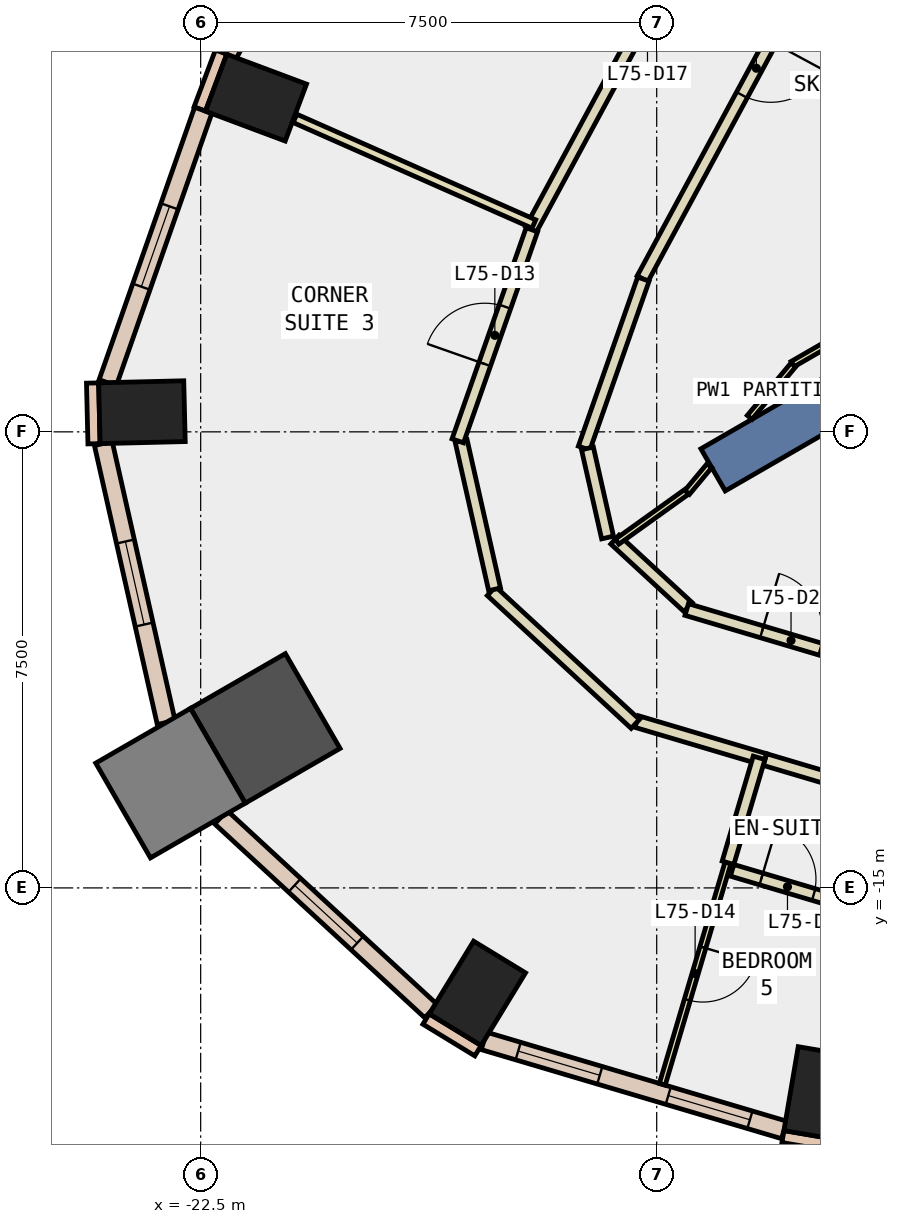
"""IFC4 building model, lengths in metres.
Left out: names, types, materials, properties, quantities, classifications, styles, units other than length and angle.
Written with IfcOpenShell. Run it as: python <this file> out.ifc"""

import sys

from ifc_helpers import new_model, si_unit, direction, frame, frame_2d, origin, origin_2d, place, context, subcontext, project, spatial, rectangle, extrude, element, fill, save


model = new_model("IFC4")
c1 = context("Model", 3, precision=1e-05, world=origin(), true_north=direction((0.0, 1.0)))
c2 = subcontext(c1, "Body", "Model", "MODEL_VIEW")
j1 = project(units=[si_unit("LENGTHUNIT", "METRE"), si_unit("PLANEANGLEUNIT", "RADIAN")], contexts=[c1])
p1 = place(None, origin())
s1 = spatial("IfcSite", under=j1, at=p1, CompositionType="ELEMENT")
p2 = place(p1, origin())
s2 = spatial("IfcBuilding", under=s1, at=p2, CompositionType="ELEMENT")
p3 = place(p2, frame((0.0, 0.0, 318.8)))
s3 = spatial("IfcBuildingStorey", under=s2, at=p3, CompositionType="ELEMENT", Elevation=318.8)
for number, where, z_axis, x_axis in (
    (1, (-12.297, -18.385, -0.34), (0.0, 0.0, 1.0), (-0.986, 0.168, 0.0)),
    (2, (-21.59, -2.004, -0.34), (0.0, 0.0, 1.0), (0.351, 0.936, 0.0)),
    (3, (-23.466, -7.177, -0.34), (0.0, 0.0, 1.0), (-0.024, 1.0, 0.0)),
):
    element("IfcColumn", number, at=place(p3, frame(where, z_axis=z_axis, x_axis=x_axis)), inside=s3, PredefinedType="COLUMN", context=c2, shape_type="SweptSolid", body=[
        extrude(rectangle(XDim=1.0, YDim=1.4, at=origin_2d()), origin(), (0.0, 0.0, 1.0), 3.6),
    ])
p4 = place(p3, frame((-21.437, -12.377, -0.34), z_axis=(0.0, 0.0, 1.0), x_axis=(0.866025403784, 0.5, 0.0)))
e4 = element("IfcColumn", 4, at=p4, inside=s3, PredefinedType="COLUMN", context=c2, shape_type="SweptSolid", body=[
    extrude(rectangle(XDim=1.8, YDim=1.8, at=origin_2d()), origin(), (0.0, 0.0, 1.0), 3.6),
])
p5 = place(p3, frame((-17.949, -16.734, -0.34), z_axis=(0.0, 0.0, 1.0), x_axis=(-0.853650808213, 0.520845752251, 0.0)))
e5 = element("IfcColumn", 5, at=p5, inside=s3, PredefinedType="COLUMN", context=c2, shape_type="SweptSolid", body=[
    extrude(rectangle(XDim=1.0, YDim=1.4, at=origin_2d()), origin(), (0.0, 0.0, 1.0), 3.6),
])
p6 = place(p3, frame((-22.996, -13.277, -0.34), z_axis=(0.0, 0.0, 1.0), x_axis=(0.866025403784, 0.5, 0.0)))
e6 = element("IfcColumn", 6, at=p6, inside=s3, PredefinedType="COLUMN", context=c2, shape_type="SweptSolid", body=[
    extrude(rectangle(XDim=1.8, YDim=1.8, at=origin_2d()), origin(), (0.0, 0.0, 1.0), 3.6),
])
p7 = place(p3, frame((-6.279, -3.625, -0.34), z_axis=(0.0, 0.0, 1.0), x_axis=(-0.866017533419, -0.500013631625, 0.0)))
e7 = element("IfcWall", 7, at=p7, inside=s3, PredefinedType="SHEAR", context=c2, shape_type="SweptSolid", body=[
    extrude(rectangle(XDim=9.0, YDim=0.8, at=frame_2d((4.5, 0.0))), origin(), (0.0, 0.0, 1.0), 3.6),
])
p8 = place(p3, frame((-22.164, -1.255, 0.0), z_axis=(0.0, 0.0, 1.0), x_axis=(-0.350962844851, -0.936389385637, 0.0)))
e8 = element("IfcWall", 8, at=p8, inside=s3, PredefinedType="STANDARD", context=c2, shape_type="SweptSolid", body=[
    extrude(rectangle(XDim=1.0, YDim=0.2, at=frame_2d((0.5, 0.0))), origin(), (0.0, 0.0, 1.0), 3.26),
])
p9 = place(p3, frame((-12.924, -19.089, 0.0), z_axis=(0.0, 0.0, 1.0), x_axis=(0.985800545746, -0.167920469293, 0.0)))
e9 = element("IfcWall", 9, at=p9, inside=s3, PredefinedType="STANDARD", context=c2, shape_type="SweptSolid", body=[
    extrude(rectangle(XDim=1.0, YDim=0.2, at=frame_2d((0.5, 0.0))), origin(), (0.0, 0.0, 1.0), 3.26),
])
p10 = place(p3, frame((-24.278, -6.697, 0.0), z_axis=(0.0, 0.0, 1.0), x_axis=(0.024186470916, -0.999707464524, 0.0)))
e10 = element("IfcWall", 10, at=p10, inside=s3, PredefinedType="STANDARD", context=c2, shape_type="SweptSolid", body=[
    extrude(rectangle(XDim=0.999, YDim=0.2, at=frame_2d((0.5, 0.0))), origin(), (0.0, 0.0, 1.0), 3.26),
])
p11 = place(p3, frame((-18.793, -17.156, 0.0), z_axis=(0.0, 0.0, 1.0), x_axis=(0.853679739553, -0.520798331677, 0.0)))
e11 = element("IfcWall", 11, at=p11, inside=s3, PredefinedType="STANDARD", context=c2, shape_type="SweptSolid", body=[
    extrude(rectangle(XDim=1.0, YDim=0.2, at=frame_2d((0.5, 0.0))), origin(), (0.0, 0.0, 1.0), 3.26),
])
p12 = place(p3, frame((-18.492, 5.285, 0.0), z_axis=(0.0, 0.0, 1.0), x_axis=(-0.475690331633, -0.879612817319, 0.0)))
e12 = element("IfcWall", 12, at=p12, inside=s3, PredefinedType="STANDARD", context=c2, shape_type="SweptSolid", body=[
    extrude(rectangle(XDim=7.484, YDim=0.3, at=frame_2d((3.742, 0.0))), origin(), (0.0, 0.0, 1.0), 3.26),
])
p13 = place(p12, frame((0.771, 0.0, 0.9)))
e13 = element("IfcOpeningElement", 13, at=p13, cuts=e12, PredefinedType="OPENING", context=c2, shape_type="SweptSolid", body=[
    extrude(rectangle(XDim=2.2, YDim=2.0, at=frame_2d((1.1, 1.0))), frame((0.0, 0.16, 0.0), z_axis=(0.0, -1.0, 0.0), x_axis=(1.0, 0.0, 0.0)), (0.0, 0.0, 1.0), 0.32),
])
p14 = place(p12, frame((4.513, 0.0, 0.9)))
e14 = element("IfcOpeningElement", 14, at=p14, cuts=e12, PredefinedType="OPENING", context=c2, shape_type="SweptSolid", body=[
    extrude(rectangle(XDim=2.2, YDim=2.0, at=frame_2d((1.1, 1.0))), frame((0.0, 0.16, 0.0), z_axis=(0.0, -1.0, 0.0), x_axis=(1.0, 0.0, 0.0)), (0.0, 0.0, 1.0), 0.32),
])
p15 = place(p3, frame((-22.458, -2.212, 0.0), z_axis=(0.0, 0.0, 1.0), x_axis=(-0.330923030855, -0.943657749213, 0.0)))
e15 = element("IfcWall", 15, at=p15, inside=s3, PredefinedType="STANDARD", context=c2, shape_type="SweptSolid", body=[
    extrude(rectangle(XDim=4.748, YDim=0.3, at=frame_2d((2.374, 0.0))), origin(), (0.0, 0.0, 1.0), 3.26),
])
p16 = place(p15, frame((1.674, 0.0, 0.9)))
e16 = element("IfcOpeningElement", 16, at=p16, cuts=e15, PredefinedType="OPENING", context=c2, shape_type="SweptSolid", body=[
    extrude(rectangle(XDim=1.4, YDim=2.0, at=frame_2d((0.7, 1.0))), frame((0.0, 0.16, 0.0), z_axis=(0.0, -1.0, 0.0), x_axis=(1.0, 0.0, 0.0)), (0.0, 0.0, 1.0), 0.32),
])
p17 = place(p3, frame((-24.101, -7.692, 0.0), z_axis=(0.0, 0.0, 1.0), x_axis=(0.219886442412, -0.975525475036, 0.0)))
e17 = element("IfcWall", 17, at=p17, inside=s3, PredefinedType="STANDARD", context=c2, shape_type="SweptSolid", body=[
    extrude(rectangle(XDim=4.703, YDim=0.3, at=frame_2d((2.352, 0.0))), origin(), (0.0, 0.0, 1.0), 3.26),
])
p18 = place(p17, frame((1.652, 0.0, 0.9)))
e18 = element("IfcOpeningElement", 18, at=p18, cuts=e17, PredefinedType="OPENING", context=c2, shape_type="SweptSolid", body=[
    extrude(rectangle(XDim=1.4, YDim=2.0, at=frame_2d((0.7, 1.0))), frame((0.0, 0.16, 0.0), z_axis=(0.0, -1.0, 0.0), x_axis=(1.0, 0.0, 0.0)), (0.0, 0.0, 1.0), 0.32),
])
p19 = place(p3, frame((-22.168, -13.837, 0.0), z_axis=(0.0, 0.0, 1.0), x_axis=(0.734934798699, -0.678137774838, 0.0)))
e19 = element("IfcWall", 19, at=p19, inside=s3, PredefinedType="STANDARD", context=c2, shape_type="SweptSolid", body=[
    extrude(rectangle(XDim=4.703, YDim=0.3, at=frame_2d((2.351, 0.0))), origin(), (0.0, 0.0, 1.0), 3.26),
])
p20 = place(p19, frame((1.651, 0.0, 0.9)))
e20 = element("IfcOpeningElement", 20, at=p20, cuts=e19, PredefinedType="OPENING", context=c2, shape_type="SweptSolid", body=[
    extrude(rectangle(XDim=1.4, YDim=2.0, at=frame_2d((0.7, 1.0))), frame((0.0, 0.16, 0.0), z_axis=(0.0, -1.0, 0.0), x_axis=(1.0, 0.0, 0.0)), (0.0, 0.0, 1.0), 0.32),
])
p21 = place(p3, frame((-17.842, -17.516, 0.0), z_axis=(0.0, 0.0, 1.0), x_axis=(0.958757933751, -0.284223898486, 0.0)))
e21 = element("IfcWall", 21, at=p21, inside=s3, PredefinedType="STANDARD", context=c2, shape_type="SweptSolid", body=[
    extrude(rectangle(XDim=5.15, YDim=0.3, at=frame_2d((2.575, 0.0))), origin(), (0.0, 0.0, 1.0), 3.26),
])
p22 = place(p21, frame((0.588, 0.0, 0.9)))
e22 = element("IfcOpeningElement", 22, at=p22, cuts=e21, PredefinedType="OPENING", context=c2, shape_type="SweptSolid", body=[
    extrude(rectangle(XDim=1.4, YDim=2.0, at=frame_2d((0.7, 1.0))), frame((0.0, 0.16, 0.0), z_axis=(0.0, -1.0, 0.0), x_axis=(1.0, 0.0, 0.0)), (0.0, 0.0, 1.0), 0.32),
])
p23 = place(p21, frame((3.163, 0.0, 0.9)))
e23 = element("IfcOpeningElement", 23, at=p23, cuts=e21, PredefinedType="OPENING", context=c2, shape_type="SweptSolid", body=[
    extrude(rectangle(XDim=1.4, YDim=2.0, at=frame_2d((0.7, 1.0))), frame((0.0, 0.16, 0.0), z_axis=(0.0, -1.0, 0.0), x_axis=(1.0, 0.0, 0.0)), (0.0, 0.0, 1.0), 0.32),
])
p24 = place(p3, frame((-11.489, 1.942, 0.0), z_axis=(0.0, 0.0, 1.0), x_axis=(-0.475643534049, -0.879638123615, 0.0)))
e24 = element("IfcWall", 24, at=p24, inside=s3, PredefinedType="PARTITIONING", context=c2, shape_type="SweptSolid", body=[
    extrude(rectangle(XDim=7.871, YDim=0.2, at=frame_2d((3.936, 0.0))), origin(), (0.0, 0.0, 1.0), 3.26),
])
p25 = place(p24, frame((3.436, 0.0, 0.0)))
e25 = element("IfcOpeningElement", 25, at=p25, cuts=e24, PredefinedType="OPENING", context=c2, shape_type="SweptSolid", body=[
    extrude(rectangle(XDim=1.0, YDim=2.1, at=frame_2d((0.5, 1.05))), frame((0.0, 0.11, 0.0), z_axis=(0.0, -1.0, 0.0), x_axis=(1.0, 0.0, 0.0)), (0.0, 0.0, 1.0), 0.22),
])
p26 = place(p3, frame((-15.219, -4.988, 0.0), z_axis=(0.0, 0.0, 1.0), x_axis=(-0.330981563235, -0.943637220969, 0.0)))
e26 = element("IfcWall", 26, at=p26, inside=s3, PredefinedType="PARTITIONING", context=c2, shape_type="SweptSolid", body=[
    extrude(rectangle(XDim=2.946, YDim=0.2, at=frame_2d((1.473, 0.0))), origin(), (0.0, 0.0, 1.0), 3.26),
])
p27 = place(p3, frame((-16.139, -7.772, 0.0), z_axis=(0.0, 0.0, 1.0), x_axis=(0.220111291919, -0.975474766034, 0.0)))
e27 = element("IfcWall", 27, at=p27, inside=s3, PredefinedType="PARTITIONING", context=c2, shape_type="SweptSolid", body=[
    extrude(rectangle(XDim=1.503, YDim=0.2, at=frame_2d((0.751, 0.0))), origin(), (0.0, 0.0, 1.0), 3.26),
])
p28 = place(p3, frame((-15.687, -9.272, 0.0), z_axis=(0.0, 0.0, 1.0), x_axis=(0.734946370973, -0.67812523312, 0.0)))
e28 = element("IfcWall", 28, at=p28, inside=s3, PredefinedType="PARTITIONING", context=c2, shape_type="SweptSolid", body=[
    extrude(rectangle(XDim=1.637, YDim=0.2, at=frame_2d((0.818, 0.0))), origin(), (0.0, 0.0, 1.0), 3.26),
])
p29 = place(p3, frame((-14.506, -10.422, 0.0), z_axis=(0.0, 0.0, 1.0), x_axis=(0.958760241353, -0.284216114252, 0.0)))
e29 = element("IfcWall", 29, at=p29, inside=s3, PredefinedType="PARTITIONING", context=c2, shape_type="SweptSolid", body=[
    extrude(rectangle(XDim=3.578, YDim=0.2, at=frame_2d((1.789, 0.0))), origin(), (0.0, 0.0, 1.0), 3.26),
])
p30 = place(p29, frame((1.289, 0.0, 0.0)))
e30 = element("IfcOpeningElement", 30, at=p30, cuts=e29, PredefinedType="OPENING", context=c2, shape_type="SweptSolid", body=[
    extrude(rectangle(XDim=1.0, YDim=2.1, at=frame_2d((0.5, 1.05))), frame((0.0, 0.11, 0.0), z_axis=(0.0, -1.0, 0.0), x_axis=(1.0, 0.0, 0.0)), (0.0, 0.0, 1.0), 0.22),
])
p31 = place(p3, frame((-17.068, -4.17, 0.0), z_axis=(0.0, 0.0, 1.0), x_axis=(0.475681790703, 0.879617436158, 0.0)))
e31 = element("IfcWall", 31, at=p31, inside=s3, PredefinedType="PARTITIONING", context=c2, shape_type="SweptSolid", body=[
    extrude(rectangle(XDim=8.058, YDim=0.2, at=frame_2d((4.029, 0.0))), origin(), (0.0, 0.0, 1.0), 3.26),
])
p32 = place(p31, frame((3.529, 0.0, 0.0)))
e32 = element("IfcOpeningElement", 32, at=p32, cuts=e31, PredefinedType="OPENING", context=c2, shape_type="SweptSolid", body=[
    extrude(rectangle(XDim=1.0, YDim=2.1, at=frame_2d((0.5, 1.05))), frame((0.0, 0.11, 0.0), z_axis=(0.0, -1.0, 0.0), x_axis=(1.0, 0.0, 0.0)), (0.0, 0.0, 1.0), 0.22),
])
p33 = place(p3, frame((-13.22, -12.889, 0.0), z_axis=(0.0, 0.0, 1.0), x_axis=(-0.958789155152, 0.284118559693, 0.0)))
e33 = element("IfcWall", 33, at=p33, inside=s3, PredefinedType="PARTITIONING", context=c2, shape_type="SweptSolid", body=[
    extrude(rectangle(XDim=2.2, YDim=0.2, at=frame_2d((1.1, 0.0))), origin(), (0.0, 0.0, 1.0), 3.26),
])
p34 = place(p3, frame((-15.352, -12.303, 0.0), z_axis=(0.0, 0.0, 1.0), x_axis=(-0.734786003021, 0.67829899732, 0.0)))
e34 = element("IfcWall", 34, at=p34, inside=s3, PredefinedType="PARTITIONING", context=c2, shape_type="SweptSolid", body=[
    extrude(rectangle(XDim=3.22, YDim=0.2, at=frame_2d((1.61, 0.0))), origin(), (0.0, 0.0, 1.0), 3.26),
])
p35 = place(p3, frame((-17.666, -10.09, 0.0), z_axis=(0.0, 0.0, 1.0), x_axis=(-0.219979161162, 0.975504571314, 0.0)))
e35 = element("IfcWall", 35, at=p35, inside=s3, PredefinedType="PARTITIONING", context=c2, shape_type="SweptSolid", body=[
    extrude(rectangle(XDim=2.5, YDim=0.2, at=frame_2d((1.25, 0.0))), origin(), (0.0, 0.0, 1.0), 3.26),
])
p36 = place(p3, frame((-18.271, -7.648, 0.0), z_axis=(0.0, 0.0, 1.0), x_axis=(0.33112192567, 0.943587977001, 0.0)))
e36 = element("IfcWall", 36, at=p36, inside=s3, PredefinedType="PARTITIONING", context=c2, shape_type="SweptSolid", body=[
    extrude(rectangle(XDim=3.678, YDim=0.2, at=frame_2d((1.839, 0.0))), origin(), (0.0, 0.0, 1.0), 3.26),
])
p37 = place(p36, frame((1.339, 0.0, 0.0)))
e37 = element("IfcOpeningElement", 37, at=p37, cuts=e36, PredefinedType="OPENING", context=c2, shape_type="SweptSolid", body=[
    extrude(rectangle(XDim=1.0, YDim=2.1, at=frame_2d((0.5, 1.05))), frame((0.0, 0.11, 0.0), z_axis=(0.0, -1.0, 0.0), x_axis=(1.0, 0.0, 0.0)), (0.0, 0.0, 1.0), 0.22),
])
p38 = place(p3, frame((-11.495, -13.401, 0.0), z_axis=(0.0, 0.0, 1.0), x_axis=(-0.958662482938, 0.284545679649, 0.0)))
e38 = element("IfcWall", 38, at=p38, inside=s3, PredefinedType="PARTITIONING", context=c2, shape_type="SweptSolid", body=[
    extrude(rectangle(XDim=1.799, YDim=0.2, at=frame_2d((0.9, 0.0))), origin(), (0.0, 0.0, 1.0), 3.26),
])
p39 = place(p3, frame((-6.705, -2.887, 0.0), z_axis=(0.0, 0.0, 1.0), x_axis=(-0.866001397039, -0.500041578597, 0.0)))
e39 = element("IfcWall", 39, at=p39, inside=s3, PredefinedType="PARTITIONING", context=c2, shape_type="SweptSolid", body=[
    extrude(rectangle(XDim=6.998, YDim=0.1, at=frame_2d((3.499, 0.0))), origin(), (0.0, 0.0, 1.0), 3.26),
])
p40 = place(p3, frame((-12.753, -6.399, 0.0), z_axis=(0.0, 0.0, 1.0), x_axis=(-0.640077503072, -0.768310347491, 0.0)))
e40 = element("IfcWall", 40, at=p40, inside=s3, PredefinedType="PARTITIONING", context=c2, shape_type="SweptSolid", body=[
    extrude(rectangle(XDim=1.123, YDim=0.1, at=frame_2d((0.562, 0.0))), origin(), (0.0, 0.0, 1.0), 3.26),
])
p41 = place(p3, frame((-14.507, -8.486, 0.0), z_axis=(0.0, 0.0, 1.0), x_axis=(-0.812782900134, -0.582566697684, 0.0)))
e41 = element("IfcWall", 41, at=p41, inside=s3, PredefinedType="PARTITIONING", context=c2, shape_type="SweptSolid", body=[
    extrude(rectangle(XDim=1.407, YDim=0.1, at=frame_2d((0.704, 0.0))), origin(), (0.0, 0.0, 1.0), 3.26),
])
p42 = place(p3, frame((-17.02, -4.082, 0.0), z_axis=(0.0, 0.0, 1.0), x_axis=(-0.914599611743, 0.404360668462, 0.0)))
e42 = element("IfcWall", 42, at=p42, inside=s3, PredefinedType="PARTITIONING", context=c2, shape_type="SweptSolid", body=[
    extrude(rectangle(XDim=4.296, YDim=0.15, at=frame_2d((2.148, 0.0))), origin(), (0.0, 0.0, 1.0), 3.26),
])
p43 = place(p3, frame((-13.828, -14.587, 0.0), z_axis=(0.0, 0.0, 1.0), x_axis=(-0.284245833657, -0.958751430794, 0.0)))
e43 = element("IfcWall", 43, at=p43, inside=s3, PredefinedType="PARTITIONING", context=c2, shape_type="SweptSolid", body=[
    extrude(rectangle(XDim=3.8, YDim=0.1, at=frame_2d((1.9, 0.0))), origin(), (0.0, 0.0, 1.0), 3.26),
])
p44 = place(p43, frame((1.45, 0.0, 0.0)))
e44 = element("IfcOpeningElement", 44, at=p44, cuts=e43, PredefinedType="OPENING", context=c2, shape_type="SweptSolid", body=[
    extrude(rectangle(XDim=0.9, YDim=2.1, at=frame_2d((0.45, 1.05))), frame((0.0, 0.06, 0.0), z_axis=(0.0, -1.0, 0.0), x_axis=(1.0, 0.0, 0.0)), (0.0, 0.0, 1.0), 0.12),
])
p45 = place(p3, frame((-13.316, -12.861, 0.0), z_axis=(0.0, 0.0, 1.0), x_axis=(-0.283898972531, -0.958854198195, 0.0)))
e45 = element("IfcWall", 45, at=p45, inside=s3, PredefinedType="PARTITIONING", context=c2, shape_type="SweptSolid", body=[
    extrude(rectangle(XDim=1.8, YDim=0.2, at=frame_2d((0.9, 0.0))), origin(), (0.0, 0.0, 1.0), 3.26),
])
p46 = place(p3, frame((-13.76, -14.711, 0.0), z_axis=(0.0, 0.0, 1.0), x_axis=(0.958772187895, -0.284175811285, 0.0)))
e46 = element("IfcWall", 46, at=p46, inside=s3, PredefinedType="PARTITIONING", context=c2, shape_type="SweptSolid", body=[
    extrude(rectangle(XDim=1.9, YDim=0.2, at=frame_2d((0.95, 0.0))), origin(), (0.0, 0.0, 1.0), 3.26),
])
p47 = place(p46, frame((0.5, 0.0, 0.0)))
e47 = element("IfcOpeningElement", 47, at=p47, cuts=e46, PredefinedType="OPENING", context=c2, shape_type="SweptSolid", body=[
    extrude(rectangle(XDim=0.9, YDim=2.1, at=frame_2d((0.45, 1.05))), frame((0.0, 0.11, 0.0), z_axis=(0.0, -1.0, 0.0), x_axis=(1.0, 0.0, 0.0)), (0.0, 0.0, 1.0), 0.22),
])
p48 = place(p3, frame((-14.133, -8.056, 0.0), z_axis=(0.0, 0.0, 1.0), x_axis=(-0.640142394154, -0.768256282244, 0.0)))
e48 = element("IfcWall", 48, at=p48, inside=s3, PredefinedType="PARTITIONING", context=c2, shape_type="SweptSolid", body=[
    extrude(rectangle(XDim=0.572, YDim=0.1, at=frame_2d((0.286, 0.0))), origin(), (0.0, 0.0, 1.0), 3.26),
])
p49 = place(p16, origin())
e49 = element("IfcWindow", 49, at=p49, inside=s3, PartitioningType="SINGLE_PANEL", PredefinedType="WINDOW", context=c2, shape_type="SweptSolid", body=[
    extrude(rectangle(XDim=1.4, YDim=2.0, at=frame_2d((0.7, 1.0))), frame((0.0, 0.03, 0.0), z_axis=(0.0, -1.0, 0.0), x_axis=(1.0, 0.0, 0.0)), (0.0, 0.0, 1.0), 0.06),
])
fill(e16, e49)
p50 = place(p18, origin())
e50 = element("IfcWindow", 50, at=p50, inside=s3, PartitioningType="SINGLE_PANEL", PredefinedType="WINDOW", context=c2, shape_type="SweptSolid", body=[
    extrude(rectangle(XDim=1.4, YDim=2.0, at=frame_2d((0.7, 1.0))), frame((0.0, 0.03, 0.0), z_axis=(0.0, -1.0, 0.0), x_axis=(1.0, 0.0, 0.0)), (0.0, 0.0, 1.0), 0.06),
])
fill(e18, e50)
p51 = place(p20, origin())
e51 = element("IfcWindow", 51, at=p51, inside=s3, PartitioningType="SINGLE_PANEL", PredefinedType="WINDOW", context=c2, shape_type="SweptSolid", body=[
    extrude(rectangle(XDim=1.4, YDim=2.0, at=frame_2d((0.7, 1.0))), frame((0.0, 0.03, 0.0), z_axis=(0.0, -1.0, 0.0), x_axis=(1.0, 0.0, 0.0)), (0.0, 0.0, 1.0), 0.06),
])
fill(e20, e51)
p52 = place(p22, origin())
e52 = element("IfcWindow", 52, at=p52, inside=s3, PartitioningType="SINGLE_PANEL", PredefinedType="WINDOW", context=c2, shape_type="SweptSolid", body=[
    extrude(rectangle(XDim=1.4, YDim=2.0, at=frame_2d((0.7, 1.0))), frame((0.0, 0.03, 0.0), z_axis=(0.0, -1.0, 0.0), x_axis=(1.0, 0.0, 0.0)), (0.0, 0.0, 1.0), 0.06),
])
fill(e22, e52)
p53 = place(p23, origin())
e53 = element("IfcWindow", 53, at=p53, inside=s3, PartitioningType="SINGLE_PANEL", PredefinedType="WINDOW", context=c2, shape_type="SweptSolid", body=[
    extrude(rectangle(XDim=1.4, YDim=2.0, at=frame_2d((0.7, 1.0))), frame((0.0, 0.03, 0.0), z_axis=(0.0, -1.0, 0.0), x_axis=(1.0, 0.0, 0.0)), (0.0, 0.0, 1.0), 0.06),
])
fill(e23, e53)
p54 = place(p37, origin())
e54 = element("IfcDoor", 54, at=p54, inside=s3, OperationType="SINGLE_SWING_LEFT", PredefinedType="DOOR", context=c2, shape_type="SweptSolid", body=[
    extrude(rectangle(XDim=1.0, YDim=2.1, at=frame_2d((0.5, 1.05))), frame((0.0, 0.025, 0.0), z_axis=(0.0, -1.0, 0.0), x_axis=(1.0, 0.0, 0.0)), (0.0, 0.0, 1.0), 0.05),
])
fill(e37, e54)
p55 = place(p44, origin())
e55 = element("IfcDoor", 55, at=p55, inside=s3, OperationType="SINGLE_SWING_RIGHT", PredefinedType="DOOR", context=c2, shape_type="SweptSolid", body=[
    extrude(rectangle(XDim=0.9, YDim=2.1, at=frame_2d((0.45, 1.05))), frame((0.0, 0.025, 0.0), z_axis=(0.0, -1.0, 0.0), x_axis=(1.0, 0.0, 0.0)), (0.0, 0.0, 1.0), 0.05),
])
fill(e44, e55)
p56 = place(p47, origin())
e56 = element("IfcDoor", 56, at=p56, inside=s3, OperationType="SINGLE_SWING_LEFT", PredefinedType="DOOR", context=c2, shape_type="SweptSolid", body=[
    extrude(rectangle(XDim=0.9, YDim=2.1, at=frame_2d((0.45, 1.05))), frame((0.0, 0.025, 0.0), z_axis=(0.0, -1.0, 0.0), x_axis=(1.0, 0.0, 0.0)), (0.0, 0.0, 1.0), 0.05),
])
fill(e47, e56)
p57 = place(p25, origin())
e57 = element("IfcDoor", 57, at=p57, inside=s3, OperationType="SINGLE_SWING_LEFT", PredefinedType="DOOR", context=c2, shape_type="SweptSolid", body=[
    extrude(rectangle(XDim=1.0, YDim=2.1, at=frame_2d((0.5, 1.05))), frame((0.0, 0.025, 0.0), z_axis=(0.0, -1.0, 0.0), x_axis=(1.0, 0.0, 0.0)), (0.0, 0.0, 1.0), 0.05),
])
fill(e25, e57)
p58 = place(p30, origin())
e58 = element("IfcDoor", 58, at=p58, inside=s3, OperationType="SINGLE_SWING_RIGHT", PredefinedType="DOOR", context=c2, shape_type="SweptSolid", body=[
    extrude(rectangle(XDim=1.0, YDim=2.1, at=frame_2d((0.5, 1.05))), frame((0.0, 0.025, 0.0), z_axis=(0.0, -1.0, 0.0), x_axis=(1.0, 0.0, 0.0)), (0.0, 0.0, 1.0), 0.05),
])
fill(e30, e58)
save(model, sys.argv[1])
